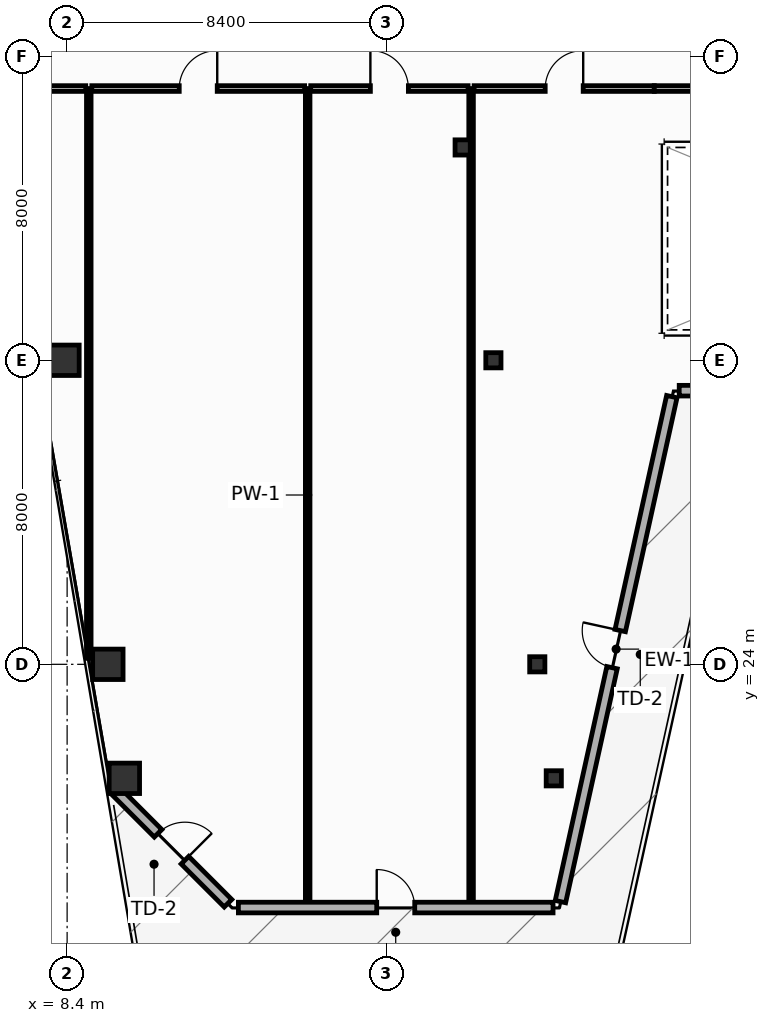
"""IFC4 building model, lengths in metres.
Left out: names, types, materials, properties, quantities, classifications, styles, units other than length and angle.
Written with IfcOpenShell. Run it as: python <this file> out.ifc"""

import sys

from ifc_helpers import new_model, si_unit, direction, frame, frame_2d, origin, origin_2d, place, context, subcontext, project, spatial, rectangle, hollow_rectangle, extrude, element, fill, save


model = new_model("IFC4")
c1 = context("Model", 3, precision=1e-05, world=origin(), true_north=direction((0.0, 1.0)))
c2 = subcontext(c1, "Body", "Model", "MODEL_VIEW")
j1 = project(units=[si_unit("LENGTHUNIT", "METRE"), si_unit("PLANEANGLEUNIT", "RADIAN")], contexts=[c1])
p1 = place(None, origin())
s1 = spatial("IfcSite", under=j1, at=p1, CompositionType="ELEMENT")
p2 = place(p1, origin())
s2 = spatial("IfcBuilding", under=s1, at=p2, CompositionType="ELEMENT")
p3 = place(p2, frame((0.0, 0.0, 230.6)))
s3 = spatial("IfcBuildingStorey", under=s2, at=p3, CompositionType="ELEMENT", Elevation=230.6)
p4 = place(p3, frame((9.906, 21.0, 0.0), z_axis=(0.0, 0.0, 1.0), x_axis=(1.0, 0.0, 0.0)))
e1 = element("IfcColumn", 1, at=p4, inside=s3, PredefinedType="COLUMN", context=c2, shape_type="SweptSolid", body=[
    extrude(hollow_rectangle(XDim=0.8, YDim=0.8, WallThickness=0.036, at=origin_2d()), origin(), (0.0, 0.0, 1.0), 3.8),
])
p5 = place(p3, frame((21.206, 21.0, 0.0), z_axis=(0.0, 0.0, 1.0), x_axis=(1.0, 0.0, 0.0)))
e2 = element("IfcColumn", 2, at=p5, inside=s3, PredefinedType="COLUMN", context=c2, shape_type="SweptSolid", body=[
    extrude(hollow_rectangle(XDim=0.4, YDim=0.4, WallThickness=0.016, at=origin_2d()), origin(), (0.0, 0.0, 1.0), 3.8),
])
p6 = place(p3, frame((9.472, 24.0, 0.0), z_axis=(0.0, 0.0, 1.0), x_axis=(1.0, 0.0, 0.0)))
e3 = element("IfcColumn", 3, at=p6, inside=s3, PredefinedType="COLUMN", context=c2, shape_type="SweptSolid", body=[
    extrude(hollow_rectangle(XDim=0.8, YDim=0.8, WallThickness=0.036, at=origin_2d()), origin(), (0.0, 0.0, 1.0), 3.8),
])
p7 = place(p3, frame((20.772, 24.0, 0.0), z_axis=(0.0, 0.0, 1.0), x_axis=(1.0, 0.0, 0.0)))
e4 = element("IfcColumn", 4, at=p7, inside=s3, PredefinedType="COLUMN", context=c2, shape_type="SweptSolid", body=[
    extrude(hollow_rectangle(XDim=0.4, YDim=0.4, WallThickness=0.016, at=origin_2d()), origin(), (0.0, 0.0, 1.0), 3.8),
])
p8 = place(p3, frame((8.317, 32.0, 0.0), z_axis=(0.0, 0.0, 1.0), x_axis=(1.0, 0.0, 0.0)))
e5 = element("IfcColumn", 5, at=p8, inside=s3, PredefinedType="COLUMN", context=c2, shape_type="SweptSolid", body=[
    extrude(hollow_rectangle(XDim=0.8, YDim=0.8, WallThickness=0.036, at=origin_2d()), origin(), (0.0, 0.0, 1.0), 3.8),
])
for number, where, z_axis, x_axis in (
    (6, (19.617, 32.0, 0.0), (0.0, 0.0, 1.0), (1.0, 0.0, 0.0)),
    (7, (18.808, 37.6, 0.0), (0.0, 0.0, 1.0), (1.0, 0.0, 0.0)),
):
    element("IfcColumn", number, at=place(p3, frame(where, z_axis=z_axis, x_axis=x_axis)), inside=s3, PredefinedType="COLUMN", context=c2, shape_type="SweptSolid", body=[
        extrude(hollow_rectangle(XDim=0.4, YDim=0.4, WallThickness=0.016, at=origin_2d()), origin(), (0.0, 0.0, 1.0), 3.8),
    ])
p9 = place(p3, frame((9.66, 20.687, 0.0), z_axis=(0.0, 0.0, 1.0), x_axis=(0.70707775441, -0.707135806771, 0.0)))
e8 = element("IfcWall", 8, at=p9, inside=s3, PredefinedType="STANDARD", context=c2, shape_type="SweptSolid", body=[
    extrude(rectangle(XDim=4.206, YDim=0.28, at=frame_2d((2.103, 0.0))), origin(), (0.0, 0.0, 1.0), 3.55),
])
p10 = place(p9, frame((1.603, 0.0, 0.0)))
e9 = element("IfcOpeningElement", 9, at=p10, cuts=e8, PredefinedType="OPENING", context=c2, shape_type="SweptSolid", body=[
    extrude(rectangle(XDim=1.0, YDim=2.2, at=frame_2d((0.5, 1.1))), frame((0.0, 0.15, 0.0), z_axis=(0.0, -1.0, 0.0), x_axis=(1.0, 0.0, 0.0)), (0.0, 0.0, 1.0), 0.3),
])
p11 = place(p3, frame((12.907, 17.6, 0.0), z_axis=(0.0, 0.0, 1.0), x_axis=(1.0, 0.0, 0.0)))
e10 = element("IfcWall", 10, at=p11, inside=s3, PredefinedType="STANDARD", context=c2, shape_type="SweptSolid", body=[
    extrude(rectangle(XDim=8.28, YDim=0.28, at=frame_2d((4.14, 0.0))), origin(), (0.0, 0.0, 1.0), 3.55),
])
p12 = place(p11, frame((3.64, 0.0, 0.0)))
e11 = element("IfcOpeningElement", 11, at=p12, cuts=e10, PredefinedType="OPENING", context=c2, shape_type="SweptSolid", body=[
    extrude(rectangle(XDim=1.0, YDim=2.2, at=frame_2d((0.5, 1.1))), frame((0.0, 0.15, 0.0), z_axis=(0.0, -1.0, 0.0), x_axis=(1.0, 0.0, 0.0)), (0.0, 0.0, 1.0), 0.3),
])
p13 = place(p3, frame((21.381, 17.756, 0.0), z_axis=(0.0, 0.0, 1.0), x_axis=(0.215414184939, 0.976522774403, 0.0)))
e12 = element("IfcWall", 12, at=p13, inside=s3, PredefinedType="STANDARD", context=c2, shape_type="SweptSolid", body=[
    extrude(rectangle(XDim=13.607, YDim=0.28, at=frame_2d((6.803, 0.0))), origin(), (0.0, 0.0, 1.0), 3.55),
])
p14 = place(p13, frame((6.304, 0.0, 0.0)))
e13 = element("IfcOpeningElement", 13, at=p14, cuts=e12, PredefinedType="OPENING", context=c2, shape_type="SweptSolid", body=[
    extrude(rectangle(XDim=1.0, YDim=2.2, at=frame_2d((0.5, 1.1))), frame((0.0, 0.15, 0.0), z_axis=(0.0, -1.0, 0.0), x_axis=(1.0, 0.0, 0.0)), (0.0, 0.0, 1.0), 0.3),
])
p15 = place(p3, frame((24.507, 31.2, 0.0), z_axis=(0.0, 0.0, 1.0), x_axis=(1.0, 0.0, 0.0)))
e14 = element("IfcWall", 14, at=p15, inside=s3, PredefinedType="STANDARD", context=c2, shape_type="SweptSolid", body=[
    extrude(rectangle(XDim=10.987, YDim=0.28, at=frame_2d((5.493, 0.0))), origin(), (0.0, 0.0, 1.0), 3.55),
])
p16 = place(p15, frame((4.993, 0.0, 0.0)))
e15 = element("IfcOpeningElement", 15, at=p16, cuts=e14, PredefinedType="OPENING", context=c2, shape_type="SweptSolid", body=[
    extrude(rectangle(XDim=1.0, YDim=2.2, at=frame_2d((0.5, 1.1))), frame((0.0, 0.15, 0.0), z_axis=(0.0, -1.0, 0.0), x_axis=(1.0, 0.0, 0.0)), (0.0, 0.0, 1.0), 0.3),
])
p17 = place(p3, frame((8.97, 24.156, 0.0), z_axis=(0.0, 0.0, 1.0), x_axis=(0.0, 1.0, 0.0)))
e16 = element("IfcWall", 16, at=p17, inside=s3, PredefinedType="PARTITIONING", context=c2, shape_type="SweptSolid", body=[
    extrude(rectangle(XDim=14.993, YDim=0.12, at=frame_2d((7.497, 0.0))), origin(), (0.0, 0.0, 1.0), 2.947),
])
for number, where, z_axis, x_axis in (
    (17, (14.73, 17.76, 0.0), (0.0, 0.0, 1.0), (0.0, 1.0, 0.0)),
    (18, (19.03, 17.76, 0.0), (0.0, 0.0, 1.0), (0.0, 1.0, 0.0)),
):
    element("IfcWall", number, at=place(p3, frame(where, z_axis=z_axis, x_axis=x_axis)), inside=s3, PredefinedType="PARTITIONING", context=c2, shape_type="SweptSolid", body=[
        extrude(rectangle(XDim=21.39, YDim=0.12, at=frame_2d((10.695, 0.0))), origin(), (0.0, 0.0, 1.0), 2.947),
    ])
p18 = place(p3, frame((6.371, 39.15, 0.0), z_axis=(0.0, 0.0, 1.0), x_axis=(1.0, 0.0, 0.0)))
e19 = element("IfcWall", 19, at=p18, inside=s3, PredefinedType="PARTITIONING", context=c2, shape_type="SweptSolid", body=[
    extrude(rectangle(XDim=2.519, YDim=0.15, at=frame_2d((1.259, 0.0))), origin(), (0.0, 0.0, 1.0), 3.085),
])
p19 = place(p3, frame((9.05, 39.15, 0.0), z_axis=(0.0, 0.0, 1.0), x_axis=(1.0, 0.0, 0.0)))
e20 = element("IfcWall", 20, at=p19, inside=s3, PredefinedType="PARTITIONING", context=c2, shape_type="SweptSolid", body=[
    extrude(rectangle(XDim=5.6, YDim=0.15, at=frame_2d((2.8, 0.0))), origin(), (0.0, 0.0, 1.0), 3.55),
])
p20 = place(p19, frame((2.3, 0.0, 0.0)))
e21 = element("IfcOpeningElement", 21, at=p20, cuts=e20, PredefinedType="OPENING", context=c2, shape_type="SweptSolid", body=[
    extrude(rectangle(XDim=1.0, YDim=2.15, at=frame_2d((0.5, 1.075))), frame((0.0, 0.085, 0.0), z_axis=(0.0, -1.0, 0.0), x_axis=(1.0, 0.0, 0.0)), (0.0, 0.0, 1.0), 0.17),
])
p21 = place(p3, frame((14.81, 39.15, 0.0), z_axis=(0.0, 0.0, 1.0), x_axis=(1.0, 0.0, 0.0)))
e22 = element("IfcWall", 22, at=p21, inside=s3, PredefinedType="PARTITIONING", context=c2, shape_type="SweptSolid", body=[
    extrude(rectangle(XDim=4.14, YDim=0.15, at=frame_2d((2.07, 0.0))), origin(), (0.0, 0.0, 1.0), 3.55),
])
p22 = place(p21, frame((1.57, 0.0, 0.0)))
e23 = element("IfcOpeningElement", 23, at=p22, cuts=e22, PredefinedType="OPENING", context=c2, shape_type="SweptSolid", body=[
    extrude(rectangle(XDim=1.0, YDim=2.15, at=frame_2d((0.5, 1.075))), frame((0.0, 0.085, 0.0), z_axis=(0.0, -1.0, 0.0), x_axis=(1.0, 0.0, 0.0)), (0.0, 0.0, 1.0), 0.17),
])
p23 = place(p3, frame((19.11, 39.15, 0.0), z_axis=(0.0, 0.0, 1.0), x_axis=(1.0, 0.0, 0.0)))
e24 = element("IfcWall", 24, at=p23, inside=s3, PredefinedType="PARTITIONING", context=c2, shape_type="SweptSolid", body=[
    extrude(rectangle(XDim=4.74, YDim=0.15, at=frame_2d((2.37, 0.0))), origin(), (0.0, 0.0, 1.0), 2.947),
])
p24 = place(p23, frame((1.87, 0.0, 0.0)))
e25 = element("IfcOpeningElement", 25, at=p24, cuts=e24, PredefinedType="OPENING", context=c2, shape_type="SweptSolid", body=[
    extrude(rectangle(XDim=1.0, YDim=2.15, at=frame_2d((0.5, 1.075))), frame((0.0, 0.085, 0.0), z_axis=(0.0, -1.0, 0.0), x_axis=(1.0, 0.0, 0.0)), (0.0, 0.0, 1.0), 0.17),
])
p25 = place(p3, frame((23.85, 39.15, 0.0), z_axis=(0.0, 0.0, 1.0), x_axis=(1.0, 0.0, 0.0)))
e26 = element("IfcWall", 26, at=p25, inside=s3, PredefinedType="PARTITIONING", context=c2, shape_type="SweptSolid", body=[
    extrude(rectangle(XDim=12.3, YDim=0.15, at=frame_2d((6.15, 0.0))), origin(), (0.0, 0.0, 1.0), 3.55),
])
p26 = place(p10, origin())
e27 = element("IfcDoor", 27, at=p26, inside=s3, OperationType="SINGLE_SWING_RIGHT", PredefinedType="DOOR", context=c2, shape_type="SweptSolid", body=[
    extrude(rectangle(XDim=1.0, YDim=2.2, at=frame_2d((0.5, 1.1))), frame((0.0, 0.025, 0.0), z_axis=(0.0, -1.0, 0.0), x_axis=(1.0, 0.0, 0.0)), (0.0, 0.0, 1.0), 0.05),
])
fill(e9, e27)
p27 = place(p12, origin())
e28 = element("IfcDoor", 28, at=p27, inside=s3, OperationType="SINGLE_SWING_LEFT", PredefinedType="DOOR", context=c2, shape_type="SweptSolid", body=[
    extrude(rectangle(XDim=1.0, YDim=2.2, at=frame_2d((0.5, 1.1))), frame((0.0, 0.025, 0.0), z_axis=(0.0, -1.0, 0.0), x_axis=(1.0, 0.0, 0.0)), (0.0, 0.0, 1.0), 0.05),
])
fill(e11, e28)
p28 = place(p14, origin())
e29 = element("IfcDoor", 29, at=p28, inside=s3, OperationType="SINGLE_SWING_RIGHT", PredefinedType="DOOR", context=c2, shape_type="SweptSolid", body=[
    extrude(rectangle(XDim=1.0, YDim=2.2, at=frame_2d((0.5, 1.1))), frame((0.0, 0.025, 0.0), z_axis=(0.0, -1.0, 0.0), x_axis=(1.0, 0.0, 0.0)), (0.0, 0.0, 1.0), 0.05),
])
fill(e13, e29)
p29 = place(p20, origin())
e30 = element("IfcDoor", 30, at=p29, inside=s3, OperationType="SINGLE_SWING_RIGHT", PredefinedType="DOOR", context=c2, shape_type="SweptSolid", body=[
    extrude(rectangle(XDim=1.0, YDim=2.15, at=frame_2d((0.5, 1.075))), frame((0.0, 0.025, 0.0), z_axis=(0.0, -1.0, 0.0), x_axis=(1.0, 0.0, 0.0)), (0.0, 0.0, 1.0), 0.05),
])
fill(e21, e30)
p30 = place(p22, origin())
e31 = element("IfcDoor", 31, at=p30, inside=s3, OperationType="SINGLE_SWING_LEFT", PredefinedType="DOOR", context=c2, shape_type="SweptSolid", body=[
    extrude(rectangle(XDim=1.0, YDim=2.15, at=frame_2d((0.5, 1.075))), frame((0.0, 0.025, 0.0), z_axis=(0.0, -1.0, 0.0), x_axis=(1.0, 0.0, 0.0)), (0.0, 0.0, 1.0), 0.05),
])
fill(e23, e31)
p31 = place(p24, origin())
e32 = element("IfcDoor", 32, at=p31, inside=s3, OperationType="SINGLE_SWING_RIGHT", PredefinedType="DOOR", context=c2, shape_type="SweptSolid", body=[
    extrude(rectangle(XDim=1.0, YDim=2.15, at=frame_2d((0.5, 1.075))), frame((0.0, 0.025, 0.0), z_axis=(0.0, -1.0, 0.0), x_axis=(1.0, 0.0, 0.0)), (0.0, 0.0, 1.0), 0.05),
])
fill(e25, e32)
save(model, sys.argv[1])
